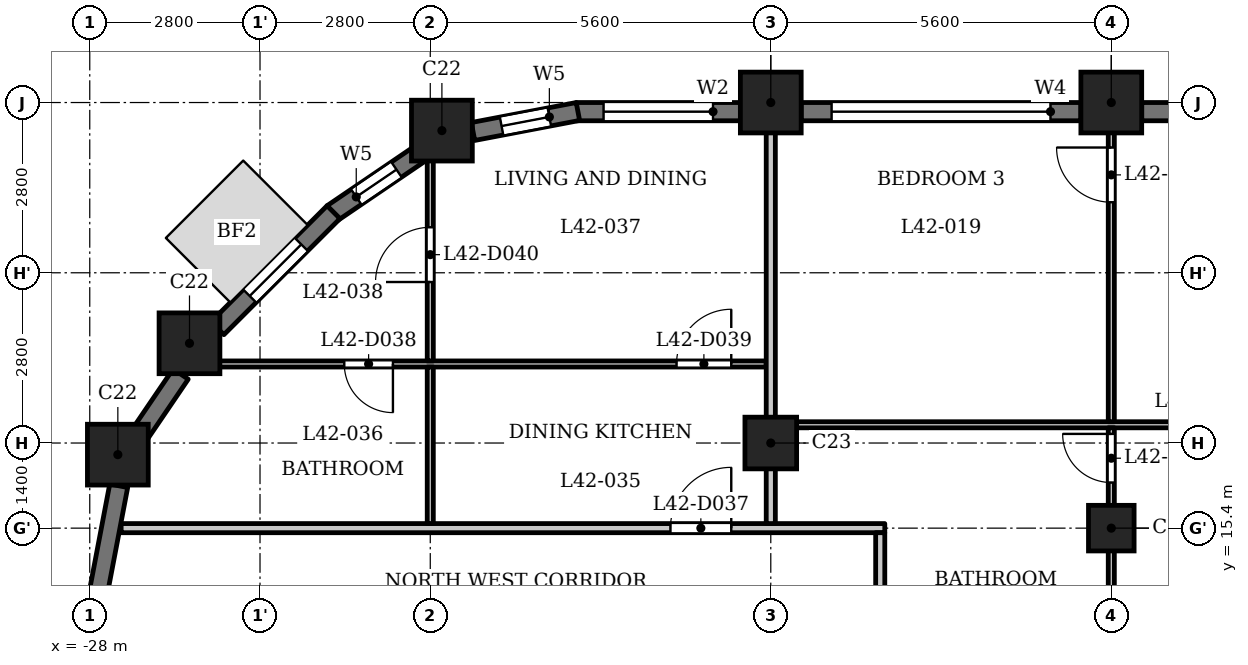
"""IFC4 building model, lengths in metres.
Left out: names, types, materials, properties, quantities, classifications, styles, units other than length and angle.
Written with IfcOpenShell. Run it as: python <this file> out.ifc"""

import sys

from ifc_helpers import new_model, si_unit, direction, frame, frame_2d, origin, origin_2d, place, context, subcontext, project, spatial, rectangle, extrude, element, fill, save


model = new_model("IFC4")
c1 = context("Model", 3, precision=1e-05, world=origin(), true_north=direction((0.0, 1.0)))
c2 = subcontext(c1, "Body", "Model", "MODEL_VIEW")
j1 = project(units=[si_unit("LENGTHUNIT", "METRE"), si_unit("PLANEANGLEUNIT", "RADIAN")], contexts=[c1])
p1 = place(None, origin())
s1 = spatial("IfcSite", under=j1, at=p1, CompositionType="ELEMENT")
p2 = place(p1, origin())
s2 = spatial("IfcBuilding", under=s1, at=p2, CompositionType="ELEMENT")
p3 = place(p2, frame((0.0, 0.0, 164.1)))
s3 = spatial("IfcBuildingStorey", under=s2, at=p3, CompositionType="ELEMENT", Elevation=164.1)
for number, where, z_axis, x_axis in (
    (1, (-11.2, 22.4, 0.0), (0.0, 0.0, 1.0), (1.0, 0.0, 0.0)),
    (2, (-16.8, 22.4, 0.0), (0.0, 0.0, 1.0), (1.0, 0.0, 0.0)),
    (3, (-22.209, 21.938, 0.0), (0.0, 0.0, 1.0), (1.0, 0.0, 0.0)),
    (4, (-26.36, 18.44, 0.0), (0.0, 0.0, 1.0), (1.0, 0.0, 0.0)),
    (5, (-27.538, 16.609, 0.0), (0.0, 0.0, 1.0), (1.0, 0.0, 0.0)),
):
    element("IfcColumn", number, at=place(p3, frame(where, z_axis=z_axis, x_axis=x_axis)), inside=s3, PredefinedType="COLUMN", context=c2, shape_type="SweptSolid", body=[
        extrude(rectangle(XDim=1.0, YDim=1.0, at=origin_2d()), origin(), (0.0, 0.0, 1.0), 3.5),
    ])
p4 = place(p3, frame((-16.8, 16.8, 0.0), z_axis=(0.0, 0.0, 1.0), x_axis=(1.0, 0.0, 0.0)))
e6 = element("IfcColumn", 6, at=p4, inside=s3, PredefinedType="COLUMN", context=c2, shape_type="SweptSolid", body=[
    extrude(rectangle(XDim=0.85, YDim=0.85, at=origin_2d()), origin(), (0.0, 0.0, 1.0), 3.5),
])
p5 = place(p3, frame((-11.2, 15.4, 0.0), z_axis=(0.0, 0.0, 1.0), x_axis=(1.0, 0.0, 0.0)))
e7 = element("IfcColumn", 7, at=p5, inside=s3, PredefinedType="COLUMN", context=c2, shape_type="SweptSolid", body=[
    extrude(rectangle(XDim=0.75, YDim=0.75, at=origin_2d()), origin(), (0.0, 0.0, 1.0), 3.5),
])
p6 = place(p3, frame((-6.1, 22.25, 0.0), z_axis=(0.0, 0.0, 1.0), x_axis=(-1.0, 0.0, 0.0)))
e8 = element("IfcWall", 8, at=p6, inside=s3, PredefinedType="SOLIDWALL", context=c2, shape_type="SweptSolid", body=[
    extrude(rectangle(XDim=4.6, YDim=0.3, at=frame_2d((2.3, 0.0))), origin(), (0.0, 0.0, 1.0), 2.45),
])
p7 = place(p6, frame((0.5, 0.0, 1.2)))
e9 = element("IfcOpeningElement", 9, at=p7, cuts=e8, PredefinedType="OPENING", context=c2, shape_type="SweptSolid", body=[
    extrude(rectangle(XDim=3.6, YDim=0.95, at=frame_2d((1.8, 0.475))), frame((0.0, 0.16, 0.0), z_axis=(0.0, -1.0, 0.0), x_axis=(1.0, 0.0, 0.0)), (0.0, 0.0, 1.0), 0.32),
])
p8 = place(p3, frame((-11.7, 22.25, 0.0), z_axis=(0.0, 0.0, 1.0), x_axis=(-1.0, 0.0, 0.0)))
e10 = element("IfcWall", 10, at=p8, inside=s3, PredefinedType="SOLIDWALL", context=c2, shape_type="SweptSolid", body=[
    extrude(rectangle(XDim=4.6, YDim=0.3, at=frame_2d((2.3, 0.0))), origin(), (0.0, 0.0, 1.0), 2.45),
])
p9 = place(p8, frame((0.5, 0.0, 1.2)))
e11 = element("IfcOpeningElement", 11, at=p9, cuts=e10, PredefinedType="OPENING", context=c2, shape_type="SweptSolid", body=[
    extrude(rectangle(XDim=3.6, YDim=0.95, at=frame_2d((1.8, 0.475))), frame((0.0, 0.16, 0.0), z_axis=(0.0, -1.0, 0.0), x_axis=(1.0, 0.0, 0.0)), (0.0, 0.0, 1.0), 0.32),
])
p10 = place(p3, frame((-17.3, 22.25, 0.0), z_axis=(0.0, 0.0, 1.0), x_axis=(-1.0, 0.0, 0.0)))
e12 = element("IfcWall", 12, at=p10, inside=s3, PredefinedType="SOLIDWALL", context=c2, shape_type="SweptSolid", body=[
    extrude(rectangle(XDim=2.7, YDim=0.3, at=frame_2d((1.35, 0.0))), origin(), (0.0, 0.0, 1.0), 2.45),
])
p11 = place(p10, frame((0.45, 0.0, 0.9)))
e13 = element("IfcOpeningElement", 13, at=p11, cuts=e12, PredefinedType="OPENING", context=c2, shape_type="SweptSolid", body=[
    extrude(rectangle(XDim=1.8, YDim=1.25, at=frame_2d((0.9, 0.625))), frame((0.0, 0.16, 0.0), z_axis=(0.0, -1.0, 0.0), x_axis=(1.0, 0.0, 0.0)), (0.0, 0.0, 1.0), 0.32),
])
p12 = place(p3, frame((-19.972, 22.253, 0.0), z_axis=(0.0, 0.0, 1.0), x_axis=(-0.982284988433, -0.187393173565, 0.0)))
e14 = element("IfcWall", 14, at=p12, inside=s3, PredefinedType="SOLIDWALL", context=c2, shape_type="SweptSolid", body=[
    extrude(rectangle(XDim=1.756, YDim=0.3, at=frame_2d((0.878, 0.0))), origin(), (0.0, 0.0, 1.0), 2.45),
])
p13 = place(p12, frame((0.478, 0.0, 0.6)))
e15 = element("IfcOpeningElement", 15, at=p13, cuts=e14, PredefinedType="OPENING", context=c2, shape_type="SweptSolid", body=[
    extrude(rectangle(XDim=0.8, YDim=1.55, at=frame_2d((0.4, 0.775))), frame((0.0, 0.16, 0.0), z_axis=(0.0, -1.0, 0.0), x_axis=(1.0, 0.0, 0.0)), (0.0, 0.0, 1.0), 0.32),
])
p14 = place(p3, frame((-22.56, 21.566, 0.0), z_axis=(0.0, 0.0, 1.0), x_axis=(-0.82707645233, -0.562089443061, 0.0)))
e16 = element("IfcWall", 16, at=p14, inside=s3, PredefinedType="SOLIDWALL", context=c2, shape_type="SweptSolid", body=[
    extrude(rectangle(XDim=1.756, YDim=0.3, at=frame_2d((0.878, 0.0))), origin(), (0.0, 0.0, 1.0), 2.45),
])
p15 = place(p14, frame((0.478, 0.0, 0.6)))
e17 = element("IfcOpeningElement", 17, at=p15, cuts=e16, PredefinedType="OPENING", context=c2, shape_type="SweptSolid", body=[
    extrude(rectangle(XDim=0.8, YDim=1.55, at=frame_2d((0.4, 0.775))), frame((0.0, 0.16, 0.0), z_axis=(0.0, -1.0, 0.0), x_axis=(1.0, 0.0, 0.0)), (0.0, 0.0, 1.0), 0.32),
])
p16 = place(p3, frame((-23.991, 20.597, 0.0), z_axis=(0.0, 0.0, 1.0), x_axis=(-0.707106781187, -0.707106781187, 0.0)))
e18 = element("IfcWall", 18, at=p16, inside=s3, PredefinedType="SOLIDWALL", context=c2, shape_type="SweptSolid", body=[
    extrude(rectangle(XDim=2.7, YDim=0.3, at=frame_2d((1.35, 0.0))), origin(), (0.0, 0.0, 1.0), 2.45),
])
p17 = place(p16, frame((0.75, 0.0, 0.6)))
e19 = element("IfcOpeningElement", 19, at=p17, cuts=e18, PredefinedType="OPENING", context=c2, shape_type="SweptSolid", body=[
    extrude(rectangle(XDim=1.2, YDim=1.55, at=frame_2d((0.6, 0.775))), frame((0.0, 0.16, 0.0), z_axis=(0.0, -1.0, 0.0), x_axis=(1.0, 0.0, 0.0)), (0.0, 0.0, 1.0), 0.32),
])
p18 = place(p3, frame((-26.504, 17.934, 0.0), z_axis=(0.0, 0.0, 1.0), x_axis=(-0.562145470373, -0.827038372833, 0.0)))
e20 = element("IfcWall", 20, at=p18, inside=s3, PredefinedType="SOLIDWALL", context=c2, shape_type="SweptSolid", body=[
    extrude(rectangle(XDim=1.177, YDim=0.3, at=frame_2d((0.588, 0.0))), origin(), (0.0, 0.0, 1.0), 3.2),
])
p19 = place(p3, frame((-27.524, 16.097, 0.0), z_axis=(0.0, 0.0, 1.0), x_axis=(-0.187259034321, -0.982310569049, 0.0)))
e21 = element("IfcWall", 21, at=p19, inside=s3, PredefinedType="SOLIDWALL", context=c2, shape_type="SweptSolid", body=[
    extrude(rectangle(XDim=1.756, YDim=0.3, at=frame_2d((0.878, 0.0))), origin(), (0.0, 0.0, 1.0), 2.45),
])
p20 = place(p3, frame((-27.484, 15.4, 0.0), z_axis=(0.0, 0.0, 1.0), x_axis=(1.0, 0.0, 0.0)))
e22 = element("IfcWall", 22, at=p20, inside=s3, PredefinedType="PARTITIONING", context=c2, shape_type="SweptSolid", body=[
    extrude(rectangle(XDim=12.559, YDim=0.15, at=frame_2d((6.279, 0.0))), origin(), (0.0, 0.0, 1.0), 3.2),
])
p21 = place(p20, frame((9.034, 0.0, 0.0)))
e23 = element("IfcOpeningElement", 23, at=p21, cuts=e22, PredefinedType="OPENING", context=c2, shape_type="SweptSolid", body=[
    extrude(rectangle(XDim=1.0, YDim=2.1, at=frame_2d((0.5, 1.05))), frame((0.0, 0.085, 0.0), z_axis=(0.0, -1.0, 0.0), x_axis=(1.0, 0.0, 0.0)), (0.0, 0.0, 1.0), 0.17),
])
p22 = place(p3, frame((-16.725, 17.1, 0.0), z_axis=(0.0, 0.0, 1.0), x_axis=(1.0, 0.0, 0.0)))
e24 = element("IfcWall", 24, at=p22, inside=s3, PredefinedType="PARTITIONING", context=c2, shape_type="SweptSolid", body=[
    extrude(rectangle(XDim=33.45, YDim=0.1, at=frame_2d((16.725, 0.0))), origin(), (0.0, 0.0, 1.0), 3.2),
])
p23 = place(p22, frame((11.925, 0.0, 0.0)))
e25 = element("IfcOpeningElement", 25, at=p23, cuts=e24, PredefinedType="OPENING", context=c2, shape_type="SweptSolid", body=[
    extrude(rectangle(XDim=0.9, YDim=2.1, at=frame_2d((0.45, 1.05))), frame((0.0, 0.06, 0.0), z_axis=(0.0, -1.0, 0.0), x_axis=(1.0, 0.0, 0.0)), (0.0, 0.0, 1.0), 0.12),
])
p24 = place(p22, frame((15.175, 0.0, 0.0)))
e26 = element("IfcOpeningElement", 26, at=p24, cuts=e24, PredefinedType="OPENING", context=c2, shape_type="SweptSolid", body=[
    extrude(rectangle(XDim=0.9, YDim=2.1, at=frame_2d((0.45, 1.05))), frame((0.0, 0.06, 0.0), z_axis=(0.0, -1.0, 0.0), x_axis=(1.0, 0.0, 0.0)), (0.0, 0.0, 1.0), 0.12),
])
p25 = place(p22, frame((6.575, 0.0, 0.0)))
e27 = element("IfcOpeningElement", 27, at=p25, cuts=e24, PredefinedType="OPENING", context=c2, shape_type="SweptSolid", body=[
    extrude(rectangle(XDim=0.9, YDim=2.1, at=frame_2d((0.45, 1.05))), frame((0.0, 0.06, 0.0), z_axis=(0.0, -1.0, 0.0), x_axis=(1.0, 0.0, 0.0)), (0.0, 0.0, 1.0), 0.12),
])
p26 = place(p22, frame((17.375, 0.0, 0.0)))
e28 = element("IfcOpeningElement", 28, at=p26, cuts=e24, PredefinedType="OPENING", context=c2, shape_type="SweptSolid", body=[
    extrude(rectangle(XDim=0.8, YDim=2.1, at=frame_2d((0.4, 1.05))), frame((0.0, 0.06, 0.0), z_axis=(0.0, -1.0, 0.0), x_axis=(1.0, 0.0, 0.0)), (0.0, 0.0, 1.0), 0.12),
])
p27 = place(p22, frame((20.025, 0.0, 0.0)))
e29 = element("IfcOpeningElement", 29, at=p27, cuts=e24, PredefinedType="OPENING", context=c2, shape_type="SweptSolid", body=[
    extrude(rectangle(XDim=0.9, YDim=2.1, at=frame_2d((0.45, 1.05))), frame((0.0, 0.06, 0.0), z_axis=(0.0, -1.0, 0.0), x_axis=(1.0, 0.0, 0.0)), (0.0, 0.0, 1.0), 0.12),
])
p28 = place(p22, frame((26.425, 0.0, 0.0)))
e30 = element("IfcOpeningElement", 30, at=p28, cuts=e24, PredefinedType="OPENING", context=c2, shape_type="SweptSolid", body=[
    extrude(rectangle(XDim=0.8, YDim=2.1, at=frame_2d((0.4, 1.05))), frame((0.0, 0.06, 0.0), z_axis=(0.0, -1.0, 0.0), x_axis=(1.0, 0.0, 0.0)), (0.0, 0.0, 1.0), 0.12),
])
p29 = place(p22, frame((23.025, 0.0, 0.0)))
e31 = element("IfcOpeningElement", 31, at=p29, cuts=e24, PredefinedType="OPENING", context=c2, shape_type="SweptSolid", body=[
    extrude(rectangle(XDim=0.9, YDim=2.1, at=frame_2d((0.45, 1.05))), frame((0.0, 0.06, 0.0), z_axis=(0.0, -1.0, 0.0), x_axis=(1.0, 0.0, 0.0)), (0.0, 0.0, 1.0), 0.12),
])
p30 = place(p22, frame((28.575, 0.0, 0.0)))
e32 = element("IfcOpeningElement", 32, at=p30, cuts=e24, PredefinedType="OPENING", context=c2, shape_type="SweptSolid", body=[
    extrude(rectangle(XDim=0.8, YDim=2.1, at=frame_2d((0.4, 1.05))), frame((0.0, 0.06, 0.0), z_axis=(0.0, -1.0, 0.0), x_axis=(1.0, 0.0, 0.0)), (0.0, 0.0, 1.0), 0.12),
])
p31 = place(p22, frame((30.725, 0.0, 0.0)))
e33 = element("IfcOpeningElement", 33, at=p31, cuts=e24, PredefinedType="OPENING", context=c2, shape_type="SweptSolid", body=[
    extrude(rectangle(XDim=0.9, YDim=2.1, at=frame_2d((0.45, 1.05))), frame((0.0, 0.06, 0.0), z_axis=(0.0, -1.0, 0.0), x_axis=(1.0, 0.0, 0.0)), (0.0, 0.0, 1.0), 0.12),
])
p32 = place(p3, frame((-26.44, 18.1, 0.0), z_axis=(0.0, 0.0, 1.0), x_axis=(1.0, 0.0, 0.0)))
e34 = element("IfcWall", 34, at=p32, inside=s3, PredefinedType="PARTITIONING", context=c2, shape_type="SweptSolid", body=[
    extrude(rectangle(XDim=9.565, YDim=0.1, at=frame_2d((4.782, 0.0))), origin(), (0.0, 0.0, 1.0), 3.2),
])
p33 = place(p32, frame((2.626, 0.0, 0.0)))
e35 = element("IfcOpeningElement", 35, at=p33, cuts=e34, PredefinedType="OPENING", context=c2, shape_type="SweptSolid", body=[
    extrude(rectangle(XDim=0.8, YDim=2.1, at=frame_2d((0.4, 1.05))), frame((0.0, 0.06, 0.0), z_axis=(0.0, -1.0, 0.0), x_axis=(1.0, 0.0, 0.0)), (0.0, 0.0, 1.0), 0.12),
])
p34 = place(p32, frame((8.09, 0.0, 0.0)))
e36 = element("IfcOpeningElement", 36, at=p34, cuts=e34, PredefinedType="OPENING", context=c2, shape_type="SweptSolid", body=[
    extrude(rectangle(XDim=0.9, YDim=2.1, at=frame_2d((0.45, 1.05))), frame((0.0, 0.06, 0.0), z_axis=(0.0, -1.0, 0.0), x_axis=(1.0, 0.0, 0.0)), (0.0, 0.0, 1.0), 0.12),
])
p35 = place(p3, frame((-22.4, 15.475, 0.0), z_axis=(0.0, 0.0, 1.0), x_axis=(0.0, 1.0, 0.0)))
e37 = element("IfcWall", 37, at=p35, inside=s3, PredefinedType="PARTITIONING", context=c2, shape_type="SweptSolid", body=[
    extrude(rectangle(XDim=2.575, YDim=0.1, at=frame_2d((1.288, 0.0))), origin(), (0.0, 0.0, 1.0), 3.2),
])
p36 = place(p3, frame((-22.4, 18.15, 0.0), z_axis=(0.0, 0.0, 1.0), x_axis=(0.0, 1.0, 0.0)))
e38 = element("IfcWall", 38, at=p36, inside=s3, PredefinedType="PARTITIONING", context=c2, shape_type="SweptSolid", body=[
    extrude(rectangle(XDim=3.57, YDim=0.1, at=frame_2d((1.785, 0.0))), origin(), (0.0, 0.0, 1.0), 3.2),
])
p37 = place(p36, frame((1.298, 0.0, 0.0)))
e39 = element("IfcOpeningElement", 39, at=p37, cuts=e38, PredefinedType="OPENING", context=c2, shape_type="SweptSolid", body=[
    extrude(rectangle(XDim=0.9, YDim=2.1, at=frame_2d((0.45, 1.05))), frame((0.0, 0.06, 0.0), z_axis=(0.0, -1.0, 0.0), x_axis=(1.0, 0.0, 0.0)), (0.0, 0.0, 1.0), 0.12),
])
p38 = place(p3, frame((-16.8, 15.475, 0.0), z_axis=(0.0, 0.0, 1.0), x_axis=(0.0, 1.0, 0.0)))
e40 = element("IfcWall", 40, at=p38, inside=s3, PredefinedType="PARTITIONING", context=c2, shape_type="SweptSolid", body=[
    extrude(rectangle(XDim=7.405, YDim=0.15, at=frame_2d((3.702, 0.0))), origin(), (0.0, 0.0, 1.0), 3.2),
])
p39 = place(p3, frame((-15.0, 13.275, 0.0), z_axis=(0.0, 0.0, 1.0), x_axis=(0.0, 1.0, 0.0)))
e41 = element("IfcWall", 41, at=p39, inside=s3, PredefinedType="PARTITIONING", context=c2, shape_type="SweptSolid", body=[
    extrude(rectangle(XDim=2.05, YDim=0.15, at=frame_2d((1.025, 0.0))), origin(), (0.0, 0.0, 1.0), 3.2),
])
p40 = place(p3, frame((-11.2, 13.275, 0.0), z_axis=(0.0, 0.0, 1.0), x_axis=(0.0, 1.0, 0.0)))
e42 = element("IfcWall", 42, at=p40, inside=s3, PredefinedType="PARTITIONING", context=c2, shape_type="SweptSolid", body=[
    extrude(rectangle(XDim=3.775, YDim=0.1, at=frame_2d((1.888, 0.0))), origin(), (0.0, 0.0, 1.0), 3.2),
])
p41 = place(p40, frame((2.875, 0.0, 0.0)))
e43 = element("IfcOpeningElement", 43, at=p41, cuts=e42, PredefinedType="OPENING", context=c2, shape_type="SweptSolid", body=[
    extrude(rectangle(XDim=0.8, YDim=2.1, at=frame_2d((0.4, 1.05))), frame((0.0, 0.06, 0.0), z_axis=(0.0, -1.0, 0.0), x_axis=(1.0, 0.0, 0.0)), (0.0, 0.0, 1.0), 0.12),
])
p42 = place(p3, frame((-11.2, 17.15, 0.0), z_axis=(0.0, 0.0, 1.0), x_axis=(0.0, 1.0, 0.0)))
e44 = element("IfcWall", 44, at=p42, inside=s3, PredefinedType="PARTITIONING", context=c2, shape_type="SweptSolid", body=[
    extrude(rectangle(XDim=5.73, YDim=0.1, at=frame_2d((2.865, 0.0))), origin(), (0.0, 0.0, 1.0), 3.2),
])
p43 = place(p42, frame((3.61, 0.0, 0.0)))
e45 = element("IfcOpeningElement", 45, at=p43, cuts=e44, PredefinedType="OPENING", context=c2, shape_type="SweptSolid", body=[
    extrude(rectangle(XDim=0.9, YDim=2.1, at=frame_2d((0.45, 1.05))), frame((0.0, 0.06, 0.0), z_axis=(0.0, -1.0, 0.0), x_axis=(1.0, 0.0, 0.0)), (0.0, 0.0, 1.0), 0.12),
])
p44 = place(p41, origin())
e46 = element("IfcDoor", 46, at=p44, inside=s3, OperationType="SINGLE_SWING_LEFT", PredefinedType="DOOR", context=c2, shape_type="SweptSolid", body=[
    extrude(rectangle(XDim=0.8, YDim=2.1, at=frame_2d((0.4, 1.05))), frame((0.0, 0.025, 0.0), z_axis=(0.0, -1.0, 0.0), x_axis=(1.0, 0.0, 0.0)), (0.0, 0.0, 1.0), 0.05),
])
fill(e43, e46)
p45 = place(p43, origin())
e47 = element("IfcDoor", 47, at=p45, inside=s3, OperationType="SINGLE_SWING_LEFT", PredefinedType="DOOR", context=c2, shape_type="SweptSolid", body=[
    extrude(rectangle(XDim=0.9, YDim=2.1, at=frame_2d((0.45, 1.05))), frame((0.0, 0.025, 0.0), z_axis=(0.0, -1.0, 0.0), x_axis=(1.0, 0.0, 0.0)), (0.0, 0.0, 1.0), 0.05),
])
fill(e45, e47)
p46 = place(p21, origin())
e48 = element("IfcDoor", 48, at=p46, inside=s3, OperationType="SINGLE_SWING_LEFT", PredefinedType="DOOR", context=c2, shape_type="SweptSolid", body=[
    extrude(rectangle(XDim=1.0, YDim=2.1, at=frame_2d((0.5, 1.05))), frame((0.0, 0.025, 0.0), z_axis=(0.0, -1.0, 0.0), x_axis=(1.0, 0.0, 0.0)), (0.0, 0.0, 1.0), 0.05),
])
fill(e23, e48)
p47 = place(p33, origin())
e49 = element("IfcDoor", 49, at=p47, inside=s3, OperationType="SINGLE_SWING_RIGHT", PredefinedType="DOOR", context=c2, shape_type="SweptSolid", body=[
    extrude(rectangle(XDim=0.8, YDim=2.1, at=frame_2d((0.4, 1.05))), frame((0.0, 0.025, 0.0), z_axis=(0.0, -1.0, 0.0), x_axis=(1.0, 0.0, 0.0)), (0.0, 0.0, 1.0), 0.05),
])
fill(e35, e49)
p48 = place(p34, origin())
e50 = element("IfcDoor", 50, at=p48, inside=s3, OperationType="SINGLE_SWING_LEFT", PredefinedType="DOOR", context=c2, shape_type="SweptSolid", body=[
    extrude(rectangle(XDim=0.9, YDim=2.1, at=frame_2d((0.45, 1.05))), frame((0.0, 0.025, 0.0), z_axis=(0.0, -1.0, 0.0), x_axis=(1.0, 0.0, 0.0)), (0.0, 0.0, 1.0), 0.05),
])
fill(e36, e50)
p49 = place(p37, origin())
e51 = element("IfcDoor", 51, at=p49, inside=s3, OperationType="SINGLE_SWING_RIGHT", PredefinedType="DOOR", context=c2, shape_type="SweptSolid", body=[
    extrude(rectangle(XDim=0.9, YDim=2.1, at=frame_2d((0.45, 1.05))), frame((0.0, 0.025, 0.0), z_axis=(0.0, -1.0, 0.0), x_axis=(1.0, 0.0, 0.0)), (0.0, 0.0, 1.0), 0.05),
])
fill(e39, e51)
p50 = place(p9, origin())
e52 = element("IfcWindow", 52, at=p50, inside=s3, PartitioningType="SINGLE_PANEL", PredefinedType="WINDOW", context=c2, shape_type="SweptSolid", body=[
    extrude(rectangle(XDim=3.6, YDim=0.95, at=frame_2d((1.8, 0.475))), frame((0.0, 0.03, 0.0), z_axis=(0.0, -1.0, 0.0), x_axis=(1.0, 0.0, 0.0)), (0.0, 0.0, 1.0), 0.06),
])
fill(e11, e52)
p51 = place(p11, origin())
e53 = element("IfcWindow", 53, at=p51, inside=s3, PartitioningType="SINGLE_PANEL", PredefinedType="WINDOW", context=c2, shape_type="SweptSolid", body=[
    extrude(rectangle(XDim=1.8, YDim=1.25, at=frame_2d((0.9, 0.625))), frame((0.0, 0.03, 0.0), z_axis=(0.0, -1.0, 0.0), x_axis=(1.0, 0.0, 0.0)), (0.0, 0.0, 1.0), 0.06),
])
fill(e13, e53)
p52 = place(p13, origin())
e54 = element("IfcWindow", 54, at=p52, inside=s3, PartitioningType="SINGLE_PANEL", PredefinedType="WINDOW", context=c2, shape_type="SweptSolid", body=[
    extrude(rectangle(XDim=0.8, YDim=1.55, at=frame_2d((0.4, 0.775))), frame((0.0, 0.03, 0.0), z_axis=(0.0, -1.0, 0.0), x_axis=(1.0, 0.0, 0.0)), (0.0, 0.0, 1.0), 0.06),
])
fill(e15, e54)
p53 = place(p15, origin())
e55 = element("IfcWindow", 55, at=p53, inside=s3, PartitioningType="SINGLE_PANEL", PredefinedType="WINDOW", context=c2, shape_type="SweptSolid", body=[
    extrude(rectangle(XDim=0.8, YDim=1.55, at=frame_2d((0.4, 0.775))), frame((0.0, 0.03, 0.0), z_axis=(0.0, -1.0, 0.0), x_axis=(1.0, 0.0, 0.0)), (0.0, 0.0, 1.0), 0.06),
])
fill(e17, e55)
p54 = place(p17, origin())
e56 = element("IfcWindow", 56, at=p54, inside=s3, PartitioningType="SINGLE_PANEL", PredefinedType="WINDOW", context=c2, shape_type="SweptSolid", body=[
    extrude(rectangle(XDim=1.2, YDim=1.55, at=frame_2d((0.6, 0.775))), frame((0.0, 0.03, 0.0), z_axis=(0.0, -1.0, 0.0), x_axis=(1.0, 0.0, 0.0)), (0.0, 0.0, 1.0), 0.06),
])
fill(e19, e56)
save(model, sys.argv[1])
